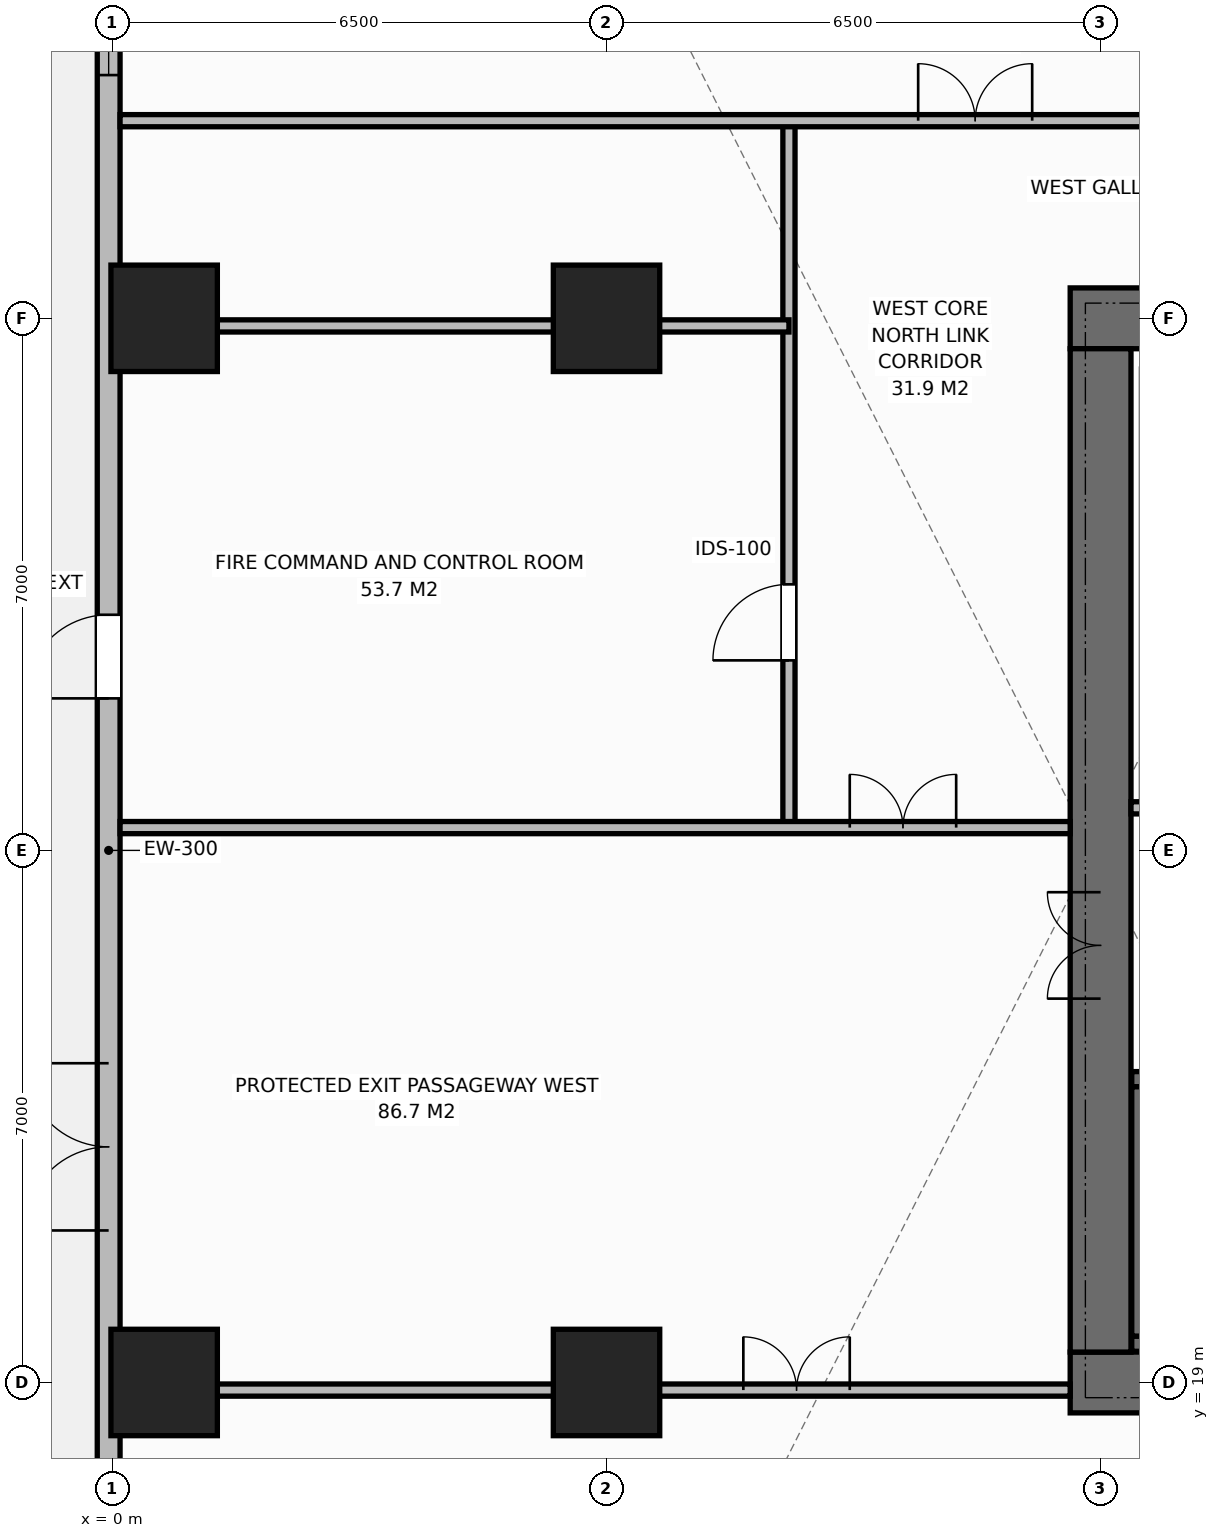
"""IFC4 building model, lengths in metres.
Left out: names, types, materials, properties, quantities, classifications, styles, units other than length and angle.
Written with IfcOpenShell. Run it as: python <this file> out.ifc"""

import sys

from ifc_helpers import new_model, si_unit, direction, frame, frame_2d, origin, origin_2d, place, context, subcontext, project, spatial, rectangle, extrude, element, fill, save


model = new_model("IFC4")
c1 = context("Model", 3, precision=1e-05, world=origin(), true_north=direction((0.0, 1.0)))
c2 = subcontext(c1, "Body", "Model", "MODEL_VIEW")
j1 = project(units=[si_unit("LENGTHUNIT", "METRE"), si_unit("PLANEANGLEUNIT", "RADIAN")], contexts=[c1])
p1 = place(None, origin())
s1 = spatial("IfcSite", under=j1, at=p1, CompositionType="ELEMENT")
p2 = place(p1, origin())
s2 = spatial("IfcBuilding", under=s1, at=p2, CompositionType="ELEMENT")
p3 = place(p2, origin())
s3 = spatial("IfcBuildingStorey", under=s2, at=p3, CompositionType="ELEMENT", Elevation=0.0)
p4 = place(p3, frame((12.6, 19.0, 0.0), z_axis=(0.0, 0.0, 1.0), x_axis=(1.0, 0.0, 0.0)))
e1 = element("IfcWall", 1, at=p4, inside=s3, PredefinedType="SHEAR", context=c2, shape_type="SweptSolid", body=[
    extrude(rectangle(XDim=13.8, YDim=0.8, at=frame_2d((6.9, 0.0))), origin(), (0.0, 0.0, 1.0), 6.0),
])
p5 = place(p4, frame((9.28, 0.0, 0.0)))
e2 = element("IfcOpeningElement", 2, at=p5, cuts=e1, PredefinedType="OPENING", context=c2, shape_type="SweptSolid", body=[
    extrude(rectangle(XDim=1.4, YDim=2.2, at=frame_2d((0.7, 1.1))), frame((0.0, 0.41, 0.0), z_axis=(0.0, -1.0, 0.0), x_axis=(1.0, 0.0, 0.0)), (0.0, 0.0, 1.0), 0.82),
])
p6 = place(p3, frame((12.6, 33.0, 0.0), z_axis=(0.0, 0.0, 1.0), x_axis=(1.0, 0.0, 0.0)))
e3 = element("IfcWall", 3, at=p6, inside=s3, PredefinedType="SHEAR", context=c2, shape_type="SweptSolid", body=[
    extrude(rectangle(XDim=13.8, YDim=0.8, at=frame_2d((6.9, 0.0))), origin(), (0.0, 0.0, 1.0), 6.0),
])
p7 = place(p6, frame((1.3, 0.0, 0.0)))
e4 = element("IfcOpeningElement", 4, at=p7, cuts=e3, PredefinedType="OPENING", context=c2, shape_type="SweptSolid", body=[
    extrude(rectangle(XDim=0.9, YDim=2.15, at=frame_2d((0.45, 1.075))), frame((0.0, 0.41, 0.0), z_axis=(0.0, -1.0, 0.0), x_axis=(1.0, 0.0, 0.0)), (0.0, 0.0, 1.0), 0.82),
])
p8 = place(p6, frame((3.9, 0.0, 0.0)))
e5 = element("IfcOpeningElement", 5, at=p8, cuts=e3, PredefinedType="OPENING", context=c2, shape_type="SweptSolid", body=[
    extrude(rectangle(XDim=0.95, YDim=2.15, at=frame_2d((0.475, 1.075))), frame((0.0, 0.41, 0.0), z_axis=(0.0, -1.0, 0.0), x_axis=(1.0, 0.0, 0.0)), (0.0, 0.0, 1.0), 0.82),
])
p9 = place(p6, frame((6.9, 0.0, 0.0)))
e6 = element("IfcOpeningElement", 6, at=p9, cuts=e3, PredefinedType="OPENING", context=c2, shape_type="SweptSolid", body=[
    extrude(rectangle(XDim=0.95, YDim=2.15, at=frame_2d((0.475, 1.075))), frame((0.0, 0.41, 0.0), z_axis=(0.0, -1.0, 0.0), x_axis=(1.0, 0.0, 0.0)), (0.0, 0.0, 1.0), 0.82),
])
p10 = place(p6, frame((9.28, 0.0, 0.0)))
e7 = element("IfcOpeningElement", 7, at=p10, cuts=e3, PredefinedType="OPENING", context=c2, shape_type="SweptSolid", body=[
    extrude(rectangle(XDim=1.4, YDim=2.2, at=frame_2d((0.7, 1.1))), frame((0.0, 0.41, 0.0), z_axis=(0.0, -1.0, 0.0), x_axis=(1.0, 0.0, 0.0)), (0.0, 0.0, 1.0), 0.82),
])
p11 = place(p3, frame((13.0, 19.4, 0.0), z_axis=(0.0, 0.0, 1.0), x_axis=(0.0, 1.0, 0.0)))
e8 = element("IfcWall", 8, at=p11, inside=s3, PredefinedType="SHEAR", context=c2, shape_type="SweptSolid", body=[
    extrude(rectangle(XDim=13.2, YDim=0.8, at=frame_2d((6.6, 0.0))), origin(), (0.0, 0.0, 1.0), 6.0),
])
p12 = place(p11, frame((4.65, 0.0, 0.0)))
e9 = element("IfcOpeningElement", 9, at=p12, cuts=e8, PredefinedType="OPENING", context=c2, shape_type="SweptSolid", body=[
    extrude(rectangle(XDim=1.4, YDim=2.2, at=frame_2d((0.7, 1.1))), frame((0.0, 0.41, 0.0), z_axis=(0.0, -1.0, 0.0), x_axis=(1.0, 0.0, 0.0)), (0.0, 0.0, 1.0), 0.82),
])
p13 = place(p3, frame((13.41, 19.51, 0.0), z_axis=(0.0, 0.0, 1.0), x_axis=(1.0, 0.0, 0.0)))
e10 = element("IfcWall", 10, at=p13, inside=s3, PredefinedType="SHEAR", context=c2, shape_type="SweptSolid", body=[
    extrude(rectangle(XDim=8.43, YDim=0.2, at=frame_2d((4.215, 0.0))), origin(), (0.0, 0.0, 1.0), 6.0),
])
p14 = place(p3, frame((13.41, 22.99, 0.0), z_axis=(0.0, 0.0, 1.0), x_axis=(1.0, 0.0, 0.0)))
e11 = element("IfcWall", 11, at=p14, inside=s3, PredefinedType="SHEAR", context=c2, shape_type="SweptSolid", body=[
    extrude(rectangle(XDim=8.43, YDim=0.2, at=frame_2d((4.215, 0.0))), origin(), (0.0, 0.0, 1.0), 6.0),
])
p15 = place(p14, frame((0.45, 0.0, 0.0)))
e12 = element("IfcOpeningElement", 12, at=p15, cuts=e11, PredefinedType="OPENING", context=c2, shape_type="SweptSolid", body=[
    extrude(rectangle(XDim=1.0, YDim=2.15, at=frame_2d((0.5, 1.075))), frame((0.0, 0.11, 0.0), z_axis=(0.0, -1.0, 0.0), x_axis=(1.0, 0.0, 0.0)), (0.0, 0.0, 1.0), 0.22),
])
p16 = place(p3, frame((13.51, 19.61, 0.0), z_axis=(0.0, 0.0, 1.0), x_axis=(0.0, 1.0, 0.0)))
e13 = element("IfcWall", 13, at=p16, inside=s3, PredefinedType="SHEAR", context=c2, shape_type="SweptSolid", body=[
    extrude(rectangle(XDim=3.28, YDim=0.2, at=frame_2d((1.64, 0.0))), origin(), (0.0, 0.0, 1.0), 6.0),
])
for number, where, z_axis, x_axis in (
    (14, (6.5, 19.0, 0.0), (0.0, 0.0, 1.0), (1.0, 0.0, 0.0)),
    (15, (6.5, 33.0, 0.0), (0.0, 0.0, 1.0), (1.0, 0.0, 0.0)),
    (16, (0.68, 19.0, 0.0), (0.0, 0.0, 1.0), (1.0, 0.0, 0.0)),
    (17, (0.68, 33.0, 0.0), (0.0, 0.0, 1.0), (1.0, 0.0, 0.0)),
):
    element("IfcColumn", number, at=place(p3, frame(where, z_axis=z_axis, x_axis=x_axis)), inside=s3, PredefinedType="COLUMN", context=c2, shape_type="SweptSolid", body=[
        extrude(rectangle(XDim=1.4, YDim=1.4, at=origin_2d()), origin(), (0.0, 0.0, 1.0), 6.0),
    ])
p17 = place(p3, frame((-0.05, 3.2, 0.0), z_axis=(0.0, 0.0, 1.0), x_axis=(0.0, 1.0, 0.0)))
e18 = element("IfcWall", 18, at=p17, inside=s3, PredefinedType="STANDARD", context=c2, shape_type="SweptSolid", body=[
    extrude(rectangle(XDim=45.6, YDim=0.3, at=frame_2d((22.8, 0.0))), origin(), (0.0, 0.0, 1.0), 5.72),
])
p18 = place(p17, frame((17.8, 0.0, 0.0)))
e19 = element("IfcOpeningElement", 19, at=p18, cuts=e18, PredefinedType="OPENING", context=c2, shape_type="SweptSolid", body=[
    extrude(rectangle(XDim=2.2, YDim=2.4, at=frame_2d((1.1, 1.2))), frame((0.0, 0.16, 0.0), z_axis=(0.0, -1.0, 0.0), x_axis=(1.0, 0.0, 0.0)), (0.0, 0.0, 1.0), 0.32),
])
p19 = place(p17, frame((24.8, 0.0, 0.0)))
e20 = element("IfcOpeningElement", 20, at=p19, cuts=e18, PredefinedType="OPENING", context=c2, shape_type="SweptSolid", body=[
    extrude(rectangle(XDim=1.1, YDim=2.2, at=frame_2d((0.55, 1.1))), frame((0.0, 0.16, 0.0), z_axis=(0.0, -1.0, 0.0), x_axis=(1.0, 0.0, 0.0)), (0.0, 0.0, 1.0), 0.32),
])
p20 = place(p17, frame((4.3, 0.0, 0.9)))
e21 = element("IfcOpeningElement", 21, at=p20, cuts=e18, PredefinedType="OPENING", context=c2, shape_type="SweptSolid", body=[
    extrude(rectangle(XDim=1.8, YDim=2.2, at=frame_2d((0.9, 1.1))), frame((0.0, 0.16, 0.0), z_axis=(0.0, -1.0, 0.0), x_axis=(1.0, 0.0, 0.0)), (0.0, 0.0, 1.0), 0.32),
])
p21 = place(p17, frame((11.3, 0.0, 0.9)))
e22 = element("IfcOpeningElement", 22, at=p21, cuts=e18, PredefinedType="OPENING", context=c2, shape_type="SweptSolid", body=[
    extrude(rectangle(XDim=1.8, YDim=2.2, at=frame_2d((0.9, 1.1))), frame((0.0, 0.16, 0.0), z_axis=(0.0, -1.0, 0.0), x_axis=(1.0, 0.0, 0.0)), (0.0, 0.0, 1.0), 0.32),
])
p22 = place(p17, frame((33.0, 0.0, 0.9)))
e23 = element("IfcOpeningElement", 23, at=p22, cuts=e18, PredefinedType="OPENING", context=c2, shape_type="SweptSolid", body=[
    extrude(rectangle(XDim=1.8, YDim=2.2, at=frame_2d((0.9, 1.1))), frame((0.0, 0.16, 0.0), z_axis=(0.0, -1.0, 0.0), x_axis=(1.0, 0.0, 0.0)), (0.0, 0.0, 1.0), 0.32),
])
p23 = place(p17, frame((39.3, 0.0, 0.9)))
e24 = element("IfcOpeningElement", 24, at=p23, cuts=e18, PredefinedType="OPENING", context=c2, shape_type="SweptSolid", body=[
    extrude(rectangle(XDim=1.8, YDim=2.2, at=frame_2d((0.9, 1.1))), frame((0.0, 0.16, 0.0), z_axis=(0.0, -1.0, 0.0), x_axis=(1.0, 0.0, 0.0)), (0.0, 0.0, 1.0), 0.32),
])
p24 = place(p3, frame((13.4, 26.56, 0.0), z_axis=(0.0, 0.0, 1.0), x_axis=(1.0, 0.0, 0.0)))
e25 = element("IfcWall", 25, at=p24, inside=s3, PredefinedType="STANDARD", context=c2, shape_type="SweptSolid", body=[
    extrude(rectangle(XDim=8.34, YDim=0.16, at=frame_2d((4.17, 0.0))), origin(), (0.0, 0.0, 1.0), 5.72),
])
p25 = place(p3, frame((0.1, 18.9, 0.0), z_axis=(0.0, 0.0, 1.0), x_axis=(1.0, 0.0, 0.0)))
e26 = element("IfcWall", 26, at=p25, inside=s3, PredefinedType="STANDARD", context=c2, shape_type="SweptSolid", body=[
    extrude(rectangle(XDim=12.5, YDim=0.16, at=frame_2d((6.25, 0.0))), origin(), (0.0, 0.0, 1.0), 4.92),
])
p26 = place(p25, frame((8.2, 0.0, 0.0)))
e27 = element("IfcOpeningElement", 27, at=p26, cuts=e26, PredefinedType="OPENING", context=c2, shape_type="SweptSolid", body=[
    extrude(rectangle(XDim=1.4, YDim=2.2, at=frame_2d((0.7, 1.1))), frame((0.0, 0.09, 0.0), z_axis=(0.0, -1.0, 0.0), x_axis=(1.0, 0.0, 0.0)), (0.0, 0.0, 1.0), 0.18),
])
p27 = place(p3, frame((8.9, 26.3, 0.0), z_axis=(0.0, 0.0, 1.0), x_axis=(0.0, 1.0, 0.0)))
e28 = element("IfcWall", 28, at=p27, inside=s3, PredefinedType="STANDARD", context=c2, shape_type="SweptSolid", body=[
    extrude(rectangle(XDim=9.3, YDim=0.16, at=frame_2d((4.65, 0.0))), origin(), (0.0, 0.0, 1.0), 5.72),
])
p28 = place(p27, frame((2.2, 0.0, 0.0)))
e29 = element("IfcOpeningElement", 29, at=p28, cuts=e28, PredefinedType="OPENING", context=c2, shape_type="SweptSolid", body=[
    extrude(rectangle(XDim=1.0, YDim=2.15, at=frame_2d((0.5, 1.075))), frame((0.0, 0.09, 0.0), z_axis=(0.0, -1.0, 0.0), x_axis=(1.0, 0.0, 0.0)), (0.0, 0.0, 1.0), 0.18),
])
p29 = place(p3, frame((0.1, 32.9, 0.0), z_axis=(0.0, 0.0, 1.0), x_axis=(1.0, 0.0, 0.0)))
e30 = element("IfcWall", 30, at=p29, inside=s3, PredefinedType="STANDARD", context=c2, shape_type="SweptSolid", body=[
    extrude(rectangle(XDim=8.8, YDim=0.16, at=frame_2d((4.4, 0.0))), origin(), (0.0, 0.0, 1.0), 4.92),
])
p30 = place(p3, frame((0.1, 35.6, 0.0), z_axis=(0.0, 0.0, 1.0), x_axis=(1.0, 0.0, 0.0)))
e31 = element("IfcWall", 31, at=p30, inside=s3, PredefinedType="STANDARD", context=c2, shape_type="SweptSolid", body=[
    extrude(rectangle(XDim=25.82, YDim=0.16, at=frame_2d((12.91, 0.0))), origin(), (0.0, 0.0, 1.0), 5.72),
])
p31 = place(p30, frame((10.5, 0.0, 0.0)))
e32 = element("IfcOpeningElement", 32, at=p31, cuts=e31, PredefinedType="OPENING", context=c2, shape_type="SweptSolid", body=[
    extrude(rectangle(XDim=1.5, YDim=2.2, at=frame_2d((0.75, 1.1))), frame((0.0, 0.09, 0.0), z_axis=(0.0, -1.0, 0.0), x_axis=(1.0, 0.0, 0.0)), (0.0, 0.0, 1.0), 0.18),
])
p32 = place(p30, frame((18.4, 0.0, 0.0)))
e33 = element("IfcOpeningElement", 33, at=p32, cuts=e31, PredefinedType="OPENING", context=c2, shape_type="SweptSolid", body=[
    extrude(rectangle(XDim=0.9, YDim=2.15, at=frame_2d((0.45, 1.075))), frame((0.0, 0.09, 0.0), z_axis=(0.0, -1.0, 0.0), x_axis=(1.0, 0.0, 0.0)), (0.0, 0.0, 1.0), 0.18),
])
p33 = place(p30, frame((21.35, 0.0, 0.0)))
e34 = element("IfcOpeningElement", 34, at=p33, cuts=e31, PredefinedType="OPENING", context=c2, shape_type="SweptSolid", body=[
    extrude(rectangle(XDim=0.9, YDim=2.15, at=frame_2d((0.45, 1.075))), frame((0.0, 0.09, 0.0), z_axis=(0.0, -1.0, 0.0), x_axis=(1.0, 0.0, 0.0)), (0.0, 0.0, 1.0), 0.18),
])
p34 = place(p30, frame((23.95, 0.0, 0.0)))
e35 = element("IfcOpeningElement", 35, at=p34, cuts=e31, PredefinedType="OPENING", context=c2, shape_type="SweptSolid", body=[
    extrude(rectangle(XDim=0.9, YDim=2.15, at=frame_2d((0.45, 1.075))), frame((0.0, 0.09, 0.0), z_axis=(0.0, -1.0, 0.0), x_axis=(1.0, 0.0, 0.0)), (0.0, 0.0, 1.0), 0.18),
])
p35 = place(p3, frame((0.1, 26.3, 0.0), z_axis=(0.0, 0.0, 1.0), x_axis=(1.0, 0.0, 0.0)))
e36 = element("IfcWall", 36, at=p35, inside=s3, PredefinedType="STANDARD", context=c2, shape_type="SweptSolid", body=[
    extrude(rectangle(XDim=12.5, YDim=0.16, at=frame_2d((6.25, 0.0))), origin(), (0.0, 0.0, 1.0), 5.72),
])
p36 = place(p35, frame((9.6, 0.0, 0.0)))
e37 = element("IfcOpeningElement", 37, at=p36, cuts=e36, PredefinedType="OPENING", context=c2, shape_type="SweptSolid", body=[
    extrude(rectangle(XDim=1.4, YDim=2.2, at=frame_2d((0.7, 1.1))), frame((0.0, 0.09, 0.0), z_axis=(0.0, -1.0, 0.0), x_axis=(1.0, 0.0, 0.0)), (0.0, 0.0, 1.0), 0.18),
])
p37 = place(p18, origin())
e38 = element("IfcDoor", 38, at=p37, inside=s3, OperationType="DOUBLE_DOOR_SINGLE_SWING", PredefinedType="DOOR", context=c2, shape_type="SweptSolid", body=[
    extrude(rectangle(XDim=2.2, YDim=2.4, at=frame_2d((1.1, 1.2))), frame((0.0, 0.025, 0.0), z_axis=(0.0, -1.0, 0.0), x_axis=(1.0, 0.0, 0.0)), (0.0, 0.0, 1.0), 0.05),
])
fill(e19, e38)
p38 = place(p19, origin())
e39 = element("IfcDoor", 39, at=p38, inside=s3, OperationType="SINGLE_SWING_LEFT", PredefinedType="DOOR", context=c2, shape_type="SweptSolid", body=[
    extrude(rectangle(XDim=1.1, YDim=2.2, at=frame_2d((0.55, 1.1))), frame((0.0, 0.025, 0.0), z_axis=(0.0, -1.0, 0.0), x_axis=(1.0, 0.0, 0.0)), (0.0, 0.0, 1.0), 0.05),
])
fill(e20, e39)
p39 = place(p22, origin())
e40 = element("IfcWindow", 40, at=p39, inside=s3, PartitioningType="SINGLE_PANEL", PredefinedType="WINDOW", context=c2, shape_type="SweptSolid", body=[
    extrude(rectangle(XDim=1.8, YDim=2.2, at=frame_2d((0.9, 1.1))), frame((0.0, 0.03, 0.0), z_axis=(0.0, -1.0, 0.0), x_axis=(1.0, 0.0, 0.0)), (0.0, 0.0, 1.0), 0.06),
])
fill(e23, e40)
p40 = place(p12, origin())
e41 = element("IfcDoor", 41, at=p40, inside=s3, OperationType="DOUBLE_DOOR_SINGLE_SWING", PredefinedType="DOOR", context=c2, shape_type="SweptSolid", body=[
    extrude(rectangle(XDim=1.4, YDim=2.2, at=frame_2d((0.7, 1.1))), frame((0.0, 0.025, 0.0), z_axis=(0.0, -1.0, 0.0), x_axis=(1.0, 0.0, 0.0)), (0.0, 0.0, 1.0), 0.05),
])
fill(e9, e41)
p41 = place(p26, origin())
e42 = element("IfcDoor", 42, at=p41, inside=s3, OperationType="DOUBLE_DOOR_SINGLE_SWING", PredefinedType="DOOR", context=c2, shape_type="SweptSolid", body=[
    extrude(rectangle(XDim=1.4, YDim=2.2, at=frame_2d((0.7, 1.1))), frame((0.0, 0.025, 0.0), z_axis=(0.0, -1.0, 0.0), x_axis=(1.0, 0.0, 0.0)), (0.0, 0.0, 1.0), 0.05),
])
fill(e27, e42)
p42 = place(p28, origin())
e43 = element("IfcDoor", 43, at=p42, inside=s3, OperationType="SINGLE_SWING_LEFT", PredefinedType="DOOR", context=c2, shape_type="SweptSolid", body=[
    extrude(rectangle(XDim=1.0, YDim=2.15, at=frame_2d((0.5, 1.075))), frame((0.0, 0.025, 0.0), z_axis=(0.0, -1.0, 0.0), x_axis=(1.0, 0.0, 0.0)), (0.0, 0.0, 1.0), 0.05),
])
fill(e29, e43)
p43 = place(p31, origin())
e44 = element("IfcDoor", 44, at=p43, inside=s3, OperationType="DOUBLE_DOOR_SINGLE_SWING", PredefinedType="DOOR", context=c2, shape_type="SweptSolid", body=[
    extrude(rectangle(XDim=1.5, YDim=2.2, at=frame_2d((0.75, 1.1))), frame((0.0, 0.025, 0.0), z_axis=(0.0, -1.0, 0.0), x_axis=(1.0, 0.0, 0.0)), (0.0, 0.0, 1.0), 0.05),
])
fill(e32, e44)
p44 = place(p36, origin())
e45 = element("IfcDoor", 45, at=p44, inside=s3, OperationType="DOUBLE_DOOR_SINGLE_SWING", PredefinedType="DOOR", context=c2, shape_type="SweptSolid", body=[
    extrude(rectangle(XDim=1.4, YDim=2.2, at=frame_2d((0.7, 1.1))), frame((0.0, 0.025, 0.0), z_axis=(0.0, -1.0, 0.0), x_axis=(1.0, 0.0, 0.0)), (0.0, 0.0, 1.0), 0.05),
])
fill(e37, e45)
save(model, sys.argv[1])
